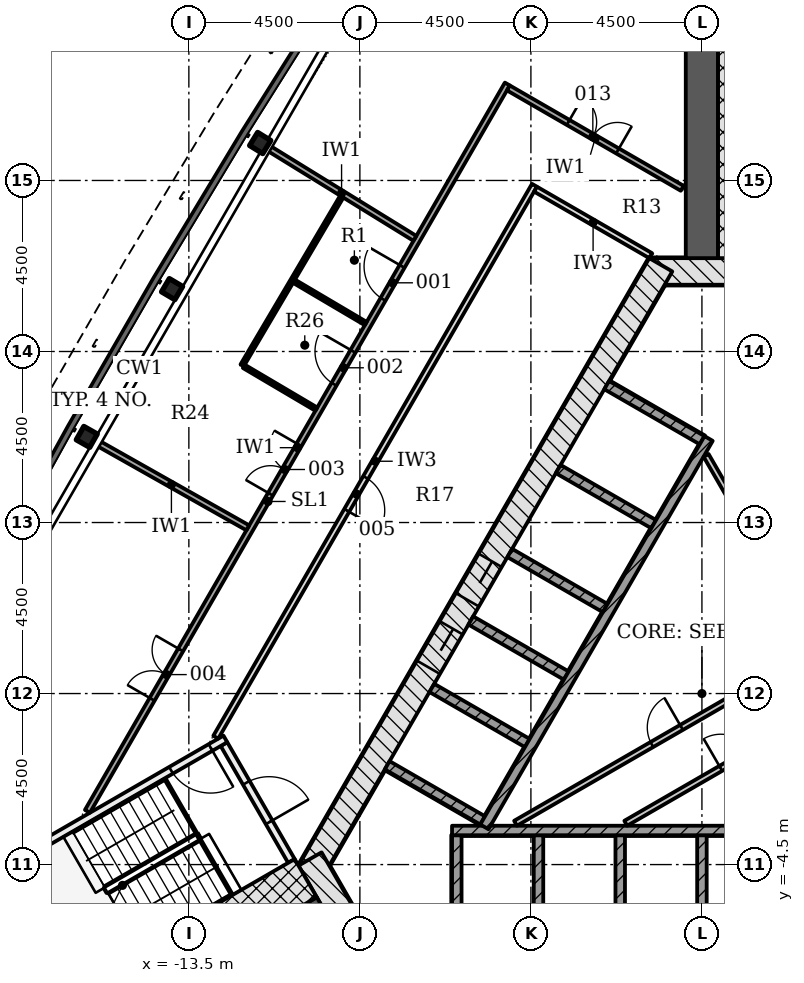
"""IFC4 building model, lengths in metres.
Left out: names, types, materials, properties, quantities, classifications, styles, units other than length and angle.
Written with IfcOpenShell. Run it as: python <this file> out.ifc"""

import sys

from ifc_helpers import new_model, si_unit, direction, frame, frame_2d, origin, origin_2d, place, context, subcontext, project, spatial, polyline, rectangle, i_section, outline, extrude, element, fill, save


model = new_model("IFC4")
c1 = context("Model", 3, precision=1e-05, world=origin(), true_north=direction((0.0, 1.0)))
c2 = subcontext(c1, "Body", "Model", "MODEL_VIEW")
j1 = project(units=[si_unit("LENGTHUNIT", "METRE"), si_unit("PLANEANGLEUNIT", "RADIAN")], contexts=[c1])
p1 = place(None, origin())
s1 = spatial("IfcSite", under=j1, at=p1, CompositionType="ELEMENT")
p2 = place(p1, origin())
s2 = spatial("IfcBuilding", under=s1, at=p2, CompositionType="ELEMENT")
p3 = place(p2, frame((0.0, 0.0, 58.2)))
s3 = spatial("IfcBuildingStorey", under=s2, at=p3, CompositionType="ELEMENT", Elevation=58.2)
p4 = place(p3, frame((1.386, 11.106, -0.2), z_axis=(0.0, 0.0, 1.0), x_axis=(-1.0, 0.0, 0.0)))
e1 = element("IfcWall", 1, at=p4, inside=s3, PredefinedType="SHEAR", context=c2, shape_type="SweptSolid", body=[
    extrude(rectangle(XDim=2.771, YDim=0.7, at=frame_2d((1.386, 0.0))), origin(), (0.0, 0.0, 1.0), 3.6),
])
p5 = place(p3, frame((-1.083, 11.281, -0.2), z_axis=(0.0, 0.0, 1.0), x_axis=(-0.500001446645, -0.866024568562, 0.0)))
e2 = element("IfcWall", 2, at=p5, inside=s3, PredefinedType="SHEAR", context=c2, shape_type="SweptSolid", body=[
    extrude(rectangle(XDim=18.458, YDim=0.7, at=frame_2d((9.229, 0.0))), origin(), (0.0, 0.0, 1.0), 3.6),
])
p6 = place(p5, frame((8.979, 0.0, 0.2)))
e3 = element("IfcOpeningElement", 3, at=p6, cuts=e2, PredefinedType="OPENING", context=c2, shape_type="SweptSolid", body=[
    extrude(rectangle(XDim=1.2, YDim=2.1, at=frame_2d((0.6, 1.05))), frame((0.0, 0.36, 0.0), z_axis=(0.0, -1.0, 0.0), x_axis=(1.0, 0.0, 0.0)), (0.0, 0.0, 1.0), 0.72),
])
p7 = place(p5, frame((11.029, 0.0, 0.2)))
e4 = element("IfcOpeningElement", 4, at=p7, cuts=e2, PredefinedType="OPENING", context=c2, shape_type="SweptSolid", body=[
    extrude(rectangle(XDim=1.2, YDim=2.1, at=frame_2d((0.6, 1.05))), frame((0.0, 0.36, 0.0), z_axis=(0.0, -1.0, 0.0), x_axis=(1.0, 0.0, 0.0)), (0.0, 0.0, 1.0), 0.72),
])
p8 = place(p3, frame((-10.311, -4.353, -0.2), z_axis=(0.0, 0.0, 1.0), x_axis=(0.500042739161, -0.866000726912, 0.0)))
e5 = element("IfcWall", 5, at=p8, inside=s3, PredefinedType="SHEAR", context=c2, shape_type="SweptSolid", body=[
    extrude(rectangle(XDim=2.771, YDim=0.7, at=frame_2d((1.386, 0.0))), origin(), (0.0, 0.0, 1.0), 3.6),
])
p9 = place(p3, frame((0.0, 11.456, -0.2), z_axis=(0.0, 0.0, 1.0), x_axis=(0.0, 1.0, 0.0)))
e6 = element("IfcWall", 6, at=p9, inside=s3, PredefinedType="SHEAR", context=c2, shape_type="SweptSolid", body=[
    extrude(rectangle(XDim=13.699, YDim=0.85, at=frame_2d((6.849, 0.0))), origin(), (0.0, 0.0, 1.0), 3.6),
])
p10 = place(p3, frame((-9.922, -5.728, -0.2), z_axis=(0.0, 0.0, 1.0), x_axis=(-0.866030067197, -0.499991922645, 0.0)))
e7 = element("IfcWall", 7, at=p10, inside=s3, PredefinedType="SHEAR", context=c2, shape_type="SweptSolid", body=[
    extrude(rectangle(XDim=13.698, YDim=0.85, at=frame_2d((6.849, 0.0))), origin(), (0.0, 0.0, 1.0), 3.6),
])
for number, where, z_axis, x_axis in (
    (8, (-11.623, 14.485, -0.2), (0.0, 0.0, 1.0), (-0.525, -0.851, 0.0)),
    (9, (-13.941, 10.641, -0.2), (0.0, 0.0, 1.0), (-0.508, -0.861, 0.0)),
    (10, (-16.186, 6.753, -0.2), (0.0, 0.0, 1.0), (-0.492, -0.871, 0.0)),
):
    element("IfcColumn", number, at=place(p3, frame(where, z_axis=z_axis, x_axis=x_axis)), inside=s3, PredefinedType="COLUMN", context=c2, shape_type="SweptSolid", body=[
        extrude(i_section(OverallWidth=0.404, OverallDepth=0.406, WebThickness=0.027, FlangeThickness=0.044, FilletRadius=0.015, at=origin_2d()), origin(), (0.0, 0.0, 1.0), 3.6),
    ])
for number, where, z_axis, x_axis in (
    (11, (-6.45, -6.228, -0.2), (0.0, 0.0, 1.0), (0.0, 1.0, 0.0)),
    (12, (-4.3, -6.228, -0.2), (0.0, 0.0, 1.0), (0.0, 1.0, 0.0)),
    (13, (-2.15, -6.228, -0.2), (0.0, 0.0, 1.0), (0.0, 1.0, 0.0)),
    (14, (0.0, -6.228, -0.2), (0.0, 0.0, 1.0), (0.0, 1.0, 0.0)),
):
    element("IfcWall", number, at=place(p3, frame(where, z_axis=z_axis, x_axis=x_axis)), inside=s3, PredefinedType="PARTITIONING", context=c2, shape_type="SweptSolid", body=[
        extrude(rectangle(XDim=2.5, YDim=0.25, at=frame_2d((1.25, 0.0))), origin(), (0.0, 0.0, 1.0), 3.6),
    ])
p11 = place(p3, frame((-6.575, -3.603, 0.0), z_axis=(0.0, 0.0, 1.0), x_axis=(1.0, 0.0, 0.0)))
e15 = element("IfcWall", 15, at=p11, inside=s3, PredefinedType="PARTITIONING", context=c2, shape_type="SweptSolid", body=[
    extrude(rectangle(XDim=13.15, YDim=0.25, at=frame_2d((6.575, 0.0))), origin(), (0.0, 0.0, 1.0), 3.4),
])
p12 = place(p3, frame((-2.506, 8.115, -0.2), z_axis=(0.0, 0.0, 1.0), x_axis=(0.865996321171, -0.50005036918, 0.0)))
e16 = element("IfcWall", 16, at=p12, inside=s3, PredefinedType="PARTITIONING", context=c2, shape_type="SweptSolid", body=[
    extrude(rectangle(XDim=2.9, YDim=0.25, at=frame_2d((1.45, 0.0))), origin(), (0.0, 0.0, 1.0), 3.6),
])
for number, where, z_axis, x_axis in (
    (17, (-3.781, 5.907, -0.2), (0.0, 0.0, 1.0), (0.866, -0.5, 0.0)),
    (18, (-5.056, 3.699, -0.2), (0.0, 0.0, 1.0), (0.866, -0.5, 0.0)),
    (19, (-6.081, 1.923, -0.2), (0.0, 0.0, 1.0), (0.866, -0.5, 0.0)),
    (20, (-7.106, 0.148, -0.2), (0.0, 0.0, 1.0), (0.866, -0.5, 0.0)),
    (21, (-8.281, -1.887, -0.2), (0.0, 0.0, 1.0), (0.866, -0.5, 0.0)),
):
    element("IfcWall", number, at=place(p3, frame(where, z_axis=z_axis, x_axis=x_axis)), inside=s3, PredefinedType="PARTITIONING", context=c2, shape_type="SweptSolid", body=[
        extrude(rectangle(XDim=2.9, YDim=0.25, at=frame_2d((1.45, 0.0))), origin(), (0.0, 0.0, 1.0), 3.6),
    ])
p13 = place(p3, frame((0.176, 6.711, 0.0), z_axis=(0.0, 0.0, 1.0), x_axis=(-0.500004227369, -0.866022963098, 0.0)))
e22 = element("IfcWall", 22, at=p13, inside=s3, PredefinedType="PARTITIONING", context=c2, shape_type="SweptSolid", body=[
    extrude(rectangle(XDim=11.8, YDim=0.25, at=frame_2d((5.9, 0.0))), origin(), (0.0, 0.0, 1.0), 3.4),
])
p14 = place(p3, frame((-4.904, -3.413, 0.0), z_axis=(0.0, 0.0, 1.0), x_axis=(0.866020716117, 0.500008119189, 0.0)))
e23 = element("IfcWall", 23, at=p14, inside=s3, PredefinedType="PARTITIONING", context=c2, shape_type="SweptSolid", body=[
    extrude(rectangle(XDim=12.182, YDim=0.15, at=frame_2d((6.091, 0.0))), origin(), (0.0, 0.0, 1.0), 3.4),
])
p15 = place(p14, frame((4.142, 0.0, 0.0)))
e24 = element("IfcOpeningElement", 24, at=p15, cuts=e23, PredefinedType="OPENING", context=c2, shape_type="SweptSolid", body=[
    extrude(rectangle(XDim=0.9, YDim=2.1, at=frame_2d((0.45, 1.05))), frame((0.0, 0.085, 0.0), z_axis=(0.0, -1.0, 0.0), x_axis=(1.0, 0.0, 0.0)), (0.0, 0.0, 1.0), 0.17),
])
p16 = place(p3, frame((-2.004, -3.413, 0.0), z_axis=(0.0, 0.0, 1.0), x_axis=(0.866030034802, 0.499991978756, 0.0)))
e25 = element("IfcWall", 25, at=p16, inside=s3, PredefinedType="PARTITIONING", context=c2, shape_type="SweptSolid", body=[
    extrude(rectangle(XDim=9.671, YDim=0.15, at=frame_2d((4.835, 0.0))), origin(), (0.0, 0.0, 1.0), 3.4),
])
p17 = place(p16, frame((2.886, 0.0, 0.0)))
e26 = element("IfcOpeningElement", 26, at=p17, cuts=e25, PredefinedType="OPENING", context=c2, shape_type="SweptSolid", body=[
    extrude(rectangle(XDim=0.9, YDim=2.1, at=frame_2d((0.45, 1.05))), frame((0.0, 0.085, 0.0), z_axis=(0.0, -1.0, 0.0), x_axis=(1.0, 0.0, 0.0)), (0.0, 0.0, 1.0), 0.17),
])
p18 = place(p3, frame((2.86, 1.503, 0.0), z_axis=(0.0, 0.0, 1.0), x_axis=(-0.500014382217, 0.866017100048, 0.0)))
e27 = element("IfcWall", 27, at=p18, inside=s3, PredefinedType="PARTITIONING", context=c2, shape_type="SweptSolid", body=[
    extrude(rectangle(XDim=5.502, YDim=0.15, at=frame_2d((2.751, 0.0))), origin(), (0.0, 0.0, 1.0), 3.4),
])
p19 = place(p3, frame((1.005, 11.456, -0.2), z_axis=(0.0, 0.0, 1.0), x_axis=(0.0, 1.0, 0.0)))
e28 = element("IfcWall", 28, at=p19, inside=s3, PredefinedType="SHEAR", context=c2, shape_type="SweptSolid", body=[
    extrude(rectangle(XDim=7.2, YDim=1.161, at=frame_2d((3.6, 0.0))), origin(), (0.0, 0.0, 1.0), 3.6),
])
p20 = place(p3, frame((-12.576, -1.331, -0.2), z_axis=(0.0, 0.0, 1.0), x_axis=(0.499970499736, -0.8660424351, 0.0)))
e29 = element("IfcWall", 29, at=p20, inside=s3, PredefinedType="SHEAR", context=c2, shape_type="SweptSolid", body=[
    extrude(rectangle(XDim=3.55, YDim=0.2, at=frame_2d((1.775, 0.0))), origin(), (0.0, 0.0, 1.0), 3.6),
])
p21 = place(p20, frame((1.175, 0.0, 0.2)))
e30 = element("IfcOpeningElement", 30, at=p21, cuts=e29, PredefinedType="OPENING", context=c2, shape_type="SweptSolid", body=[
    extrude(rectangle(XDim=1.2, YDim=2.1, at=frame_2d((0.6, 1.05))), frame((0.0, 0.11, 0.0), z_axis=(0.0, -1.0, 0.0), x_axis=(1.0, 0.0, 0.0)), (0.0, 0.0, 1.0), 0.22),
])
p22 = place(p3, frame((-12.539, -1.194, -0.2), z_axis=(0.0, 0.0, 1.0), x_axis=(-0.866045472092, -0.499965239061, 0.0)))
e31 = element("IfcWall", 31, at=p22, inside=s3, PredefinedType="SHEAR", context=c2, shape_type="SweptSolid", body=[
    extrude(rectangle(XDim=5.6, YDim=0.2, at=frame_2d((2.8, 0.0))), origin(), (0.0, 0.0, 1.0), 3.6),
])
p23 = place(p22, frame((0.45, 0.0, 0.2)))
e32 = element("IfcOpeningElement", 32, at=p23, cuts=e31, PredefinedType="OPENING", context=c2, shape_type="SweptSolid", body=[
    extrude(rectangle(XDim=1.2, YDim=2.1, at=frame_2d((0.6, 1.05))), frame((0.0, 0.11, 0.0), z_axis=(0.0, -1.0, 0.0), x_axis=(1.0, 0.0, 0.0)), (0.0, 0.0, 1.0), 0.22),
])
p24 = place(p3, frame((-10.424, -4.858, -0.2), z_axis=(0.0, 0.0, 1.0), x_axis=(-0.866033125095, -0.499986626058, 0.0)))
e33 = element("IfcWall", 33, at=p24, inside=s3, PredefinedType="SHEAR", context=c2, shape_type="SweptSolid", body=[
    extrude(rectangle(XDim=7.2, YDim=1.161, at=frame_2d((3.6, 0.0))), origin(), (0.0, 0.0, 1.0), 3.6),
])
p25 = place(p3, frame((0.0, 0.0, -0.2)))
e34 = element("IfcWall", 34, at=p25, inside=s3, PredefinedType="SHEAR", context=c2, shape_type="SweptSolid", body=[
    extrude(outline(polyline([(-17.439, -3.907), (-18.025, -6.093), (-16.95, -7.955), (-16.777, -7.855), (-17.81, -6.065), (-17.267, -4.039), (-17.339, -4.081), (-17.339, -4.081), (-17.339, -4.081), (-17.339, -4.081), (-17.339, -4.081), (-17.339, -4.081), (-17.339, -4.081), (-17.339, -4.081), (-17.339, -4.081), (-17.339, -4.081), (-17.339, -4.081), (-17.339, -4.081), (-17.339, -4.081), (-17.339, -4.081), (-17.339, -4.081), (-17.339, -4.081), (-17.339, -4.081), (-17.439, -3.907)])), origin(), (0.0, 0.0, 1.0), 3.6),
])
p26 = place(p3, frame((-16.169, -3.099, 0.0), z_axis=(0.0, 0.0, 1.0), x_axis=(0.499999805269, 0.866025516212, 0.0)))
e35 = element("IfcWall", 35, at=p26, inside=s3, PredefinedType="PARTITIONING", context=c2, shape_type="SweptSolid", body=[
    extrude(rectangle(XDim=22.097, YDim=0.15, at=frame_2d((11.049, 0.0))), origin(), (0.0, 0.0, 1.0), 2.778),
])
p27 = place(p26, frame((15.558, 0.0, 0.0)))
e36 = element("IfcOpeningElement", 36, at=p27, cuts=e35, PredefinedType="OPENING", context=c2, shape_type="SweptSolid", body=[
    extrude(rectangle(XDim=1.0, YDim=2.1, at=frame_2d((0.5, 1.05))), frame((0.0, 0.085, 0.0), z_axis=(0.0, -1.0, 0.0), x_axis=(1.0, 0.0, 0.0)), (0.0, 0.0, 1.0), 0.17),
])
p28 = place(p26, frame((12.976, 0.0, 0.0)))
e37 = element("IfcOpeningElement", 37, at=p28, cuts=e35, PredefinedType="OPENING", context=c2, shape_type="SweptSolid", body=[
    extrude(rectangle(XDim=1.0, YDim=2.1, at=frame_2d((0.5, 1.05))), frame((0.0, 0.085, 0.0), z_axis=(0.0, -1.0, 0.0), x_axis=(1.0, 0.0, 0.0)), (0.0, 0.0, 1.0), 0.17),
])
p29 = place(p26, frame((9.635, 0.0, 0.0)))
e38 = element("IfcOpeningElement", 38, at=p29, cuts=e35, PredefinedType="OPENING", context=c2, shape_type="SweptSolid", body=[
    extrude(rectangle(XDim=1.5, YDim=2.1, at=frame_2d((0.75, 1.05))), frame((0.0, 0.085, 0.0), z_axis=(0.0, -1.0, 0.0), x_axis=(1.0, 0.0, 0.0)), (0.0, 0.0, 1.0), 0.17),
])
p30 = place(p26, frame((3.404, 0.0, 0.0)))
e39 = element("IfcOpeningElement", 39, at=p30, cuts=e35, PredefinedType="OPENING", context=c2, shape_type="SweptSolid", body=[
    extrude(rectangle(XDim=1.5, YDim=2.1, at=frame_2d((0.75, 1.05))), frame((0.0, 0.085, 0.0), z_axis=(0.0, -1.0, 0.0), x_axis=(1.0, 0.0, 0.0)), (0.0, 0.0, 1.0), 0.17),
])
p31 = place(p3, frame((-4.407, 13.374, 0.0), z_axis=(0.0, 0.0, 1.0), x_axis=(-0.499997181693, -0.866027030928, 0.0)))
e40 = element("IfcWall", 40, at=p31, inside=s3, PredefinedType="PARTITIONING", context=c2, shape_type="SweptSolid", body=[
    extrude(rectangle(XDim=16.77, YDim=0.15, at=frame_2d((8.385, 0.0))), origin(), (0.0, 0.0, 1.0), 2.778),
])
p32 = place(p31, frame((8.879, 0.0, 0.0)))
e41 = element("IfcOpeningElement", 41, at=p32, cuts=e40, PredefinedType="OPENING", context=c2, shape_type="SweptSolid", body=[
    extrude(rectangle(XDim=1.0, YDim=2.1, at=frame_2d((0.5, 1.05))), frame((0.0, 0.085, 0.0), z_axis=(0.0, -1.0, 0.0), x_axis=(1.0, 0.0, 0.0)), (0.0, 0.0, 1.0), 0.17),
])
p33 = place(p3, frame((-5.093, 15.935, 0.0), z_axis=(0.0, 0.0, 1.0), x_axis=(0.866033195618, -0.499986503906, 0.0)))
e42 = element("IfcWall", 42, at=p33, inside=s3, PredefinedType="PARTITIONING", context=c2, shape_type="SweptSolid", body=[
    extrude(rectangle(XDim=5.282, YDim=0.15, at=frame_2d((2.641, 0.0))), origin(), (0.0, 0.0, 1.0), 3.4),
])
p34 = place(p33, frame((1.816, 0.0, 0.0)))
e43 = element("IfcOpeningElement", 43, at=p34, cuts=e42, PredefinedType="OPENING", context=c2, shape_type="SweptSolid", body=[
    extrude(rectangle(XDim=1.5, YDim=2.1, at=frame_2d((0.75, 1.05))), frame((0.0, 0.085, 0.0), z_axis=(0.0, -1.0, 0.0), x_axis=(1.0, 0.0, 0.0)), (0.0, 0.0, 1.0), 0.17),
])
p35 = place(p3, frame((-4.379, 13.271, 0.0), z_axis=(0.0, 0.0, 1.0), x_axis=(0.866019471182, -0.500010275428, 0.0)))
e44 = element("IfcWall", 44, at=p35, inside=s3, PredefinedType="PARTITIONING", context=c2, shape_type="SweptSolid", body=[
    extrude(rectangle(XDim=3.5, YDim=0.15, at=frame_2d((1.75, 0.0))), origin(), (0.0, 0.0, 1.0), 3.4),
])
p36 = place(p3, frame((-15.969, 6.63, 0.0), z_axis=(0.0, 0.0, 1.0), x_axis=(0.870757830179, -0.491712112097, 0.0)))
e45 = element("IfcWall", 45, at=p36, inside=s3, PredefinedType="PARTITIONING", context=c2, shape_type="SweptSolid", body=[
    extrude(rectangle(XDim=4.615, YDim=0.15, at=frame_2d((2.308, 0.0))), origin(), (0.0, 0.0, 1.0), 2.778),
])
p37 = place(p3, frame((-11.41, 14.354, 0.0), z_axis=(0.0, 0.0, 1.0), x_axis=(0.851336169767, -0.52462055435, 0.0)))
e46 = element("IfcWall", 46, at=p37, inside=s3, PredefinedType="PARTITIONING", context=c2, shape_type="SweptSolid", body=[
    extrude(rectangle(XDim=4.53, YDim=0.15, at=frame_2d((2.265, 0.0))), origin(), (0.0, 0.0, 1.0), 2.778),
])
p38 = place(p3, frame((-9.478, 13.074, 0.0), z_axis=(0.0, 0.0, 1.0), x_axis=(-0.508234581351, -0.86121867741, 0.0)))
e47 = element("IfcWall", 47, at=p38, inside=s3, PredefinedType="PARTITIONING", context=c2, shape_type="SweptSolid", body=[
    extrude(rectangle(XDim=5.155, YDim=0.1, at=frame_2d((2.577, 0.0))), origin(), (0.0, 0.0, 1.0), 2.778),
])
p39 = place(p3, frame((-12.055, 8.61, 0.0), z_axis=(0.0, 0.0, 1.0), x_axis=(0.861222482917, -0.508228132749, 0.0)))
e48 = element("IfcWall", 48, at=p39, inside=s3, PredefinedType="PARTITIONING", context=c2, shape_type="SweptSolid", body=[
    extrude(rectangle(XDim=2.216, YDim=0.1, at=frame_2d((1.108, 0.0))), origin(), (0.0, 0.0, 1.0), 3.4),
])
p40 = place(p3, frame((-10.733, 10.849, 0.0), z_axis=(0.0, 0.0, 1.0), x_axis=(0.861225852057, -0.5082224235, 0.0)))
e49 = element("IfcWall", 49, at=p40, inside=s3, PredefinedType="PARTITIONING", context=c2, shape_type="SweptSolid", body=[
    extrude(rectangle(XDim=2.191, YDim=0.1, at=frame_2d((1.095, 0.0))), origin(), (0.0, 0.0, 1.0), 3.4),
])
p41 = place(p6, origin())
e50 = element("IfcDoor", 50, at=p41, inside=s3, OperationType="DOUBLE_DOOR_SLIDING", PredefinedType="DOOR", context=c2, shape_type="SweptSolid", body=[
    extrude(rectangle(XDim=1.2, YDim=2.1, at=frame_2d((0.6, 1.05))), frame((0.0, 0.025, 0.0), z_axis=(0.0, -1.0, 0.0), x_axis=(1.0, 0.0, 0.0)), (0.0, 0.0, 1.0), 0.05),
])
fill(e3, e50)
p42 = place(p7, origin())
e51 = element("IfcDoor", 51, at=p42, inside=s3, OperationType="DOUBLE_DOOR_SLIDING", PredefinedType="DOOR", context=c2, shape_type="SweptSolid", body=[
    extrude(rectangle(XDim=1.2, YDim=2.1, at=frame_2d((0.6, 1.05))), frame((0.0, 0.025, 0.0), z_axis=(0.0, -1.0, 0.0), x_axis=(1.0, 0.0, 0.0)), (0.0, 0.0, 1.0), 0.05),
])
fill(e4, e51)
p43 = place(p17, origin())
e52 = element("IfcDoor", 52, at=p43, inside=s3, OperationType="SINGLE_SWING_LEFT", PredefinedType="DOOR", context=c2, shape_type="SweptSolid", body=[
    extrude(rectangle(XDim=0.9, YDim=2.1, at=frame_2d((0.45, 1.05))), frame((0.0, 0.025, 0.0), z_axis=(0.0, -1.0, 0.0), x_axis=(1.0, 0.0, 0.0)), (0.0, 0.0, 1.0), 0.05),
])
fill(e26, e52)
p44 = place(p15, origin())
e53 = element("IfcDoor", 53, at=p44, inside=s3, OperationType="SINGLE_SWING_RIGHT", PredefinedType="DOOR", context=c2, shape_type="SweptSolid", body=[
    extrude(rectangle(XDim=0.9, YDim=2.1, at=frame_2d((0.45, 1.05))), frame((0.0, 0.025, 0.0), z_axis=(0.0, -1.0, 0.0), x_axis=(1.0, 0.0, 0.0)), (0.0, 0.0, 1.0), 0.05),
])
fill(e24, e53)
p45 = place(p21, origin())
e54 = element("IfcDoor", 54, at=p45, inside=s3, OperationType="SINGLE_SWING_RIGHT", PredefinedType="DOOR", context=c2, shape_type="SweptSolid", body=[
    extrude(rectangle(XDim=1.2, YDim=2.1, at=frame_2d((0.6, 1.05))), frame((0.0, 0.025, 0.0), z_axis=(0.0, -1.0, 0.0), x_axis=(1.0, 0.0, 0.0)), (0.0, 0.0, 1.0), 0.05),
])
fill(e30, e54)
p46 = place(p23, origin())
e55 = element("IfcDoor", 55, at=p46, inside=s3, OperationType="SINGLE_SWING_LEFT", PredefinedType="DOOR", context=c2, shape_type="SweptSolid", body=[
    extrude(rectangle(XDim=1.2, YDim=2.1, at=frame_2d((0.6, 1.05))), frame((0.0, 0.025, 0.0), z_axis=(0.0, -1.0, 0.0), x_axis=(1.0, 0.0, 0.0)), (0.0, 0.0, 1.0), 0.05),
])
fill(e32, e55)
p47 = place(p27, origin())
e56 = element("IfcDoor", 56, at=p47, inside=s3, OperationType="SINGLE_SWING_RIGHT", PredefinedType="DOOR", context=c2, shape_type="SweptSolid", body=[
    extrude(rectangle(XDim=1.0, YDim=2.1, at=frame_2d((0.5, 1.05))), frame((0.0, 0.025, 0.0), z_axis=(0.0, -1.0, 0.0), x_axis=(1.0, 0.0, 0.0)), (0.0, 0.0, 1.0), 0.05),
])
fill(e36, e56)
p48 = place(p28, origin())
e57 = element("IfcDoor", 57, at=p48, inside=s3, OperationType="SINGLE_SWING_RIGHT", PredefinedType="DOOR", context=c2, shape_type="SweptSolid", body=[
    extrude(rectangle(XDim=1.0, YDim=2.1, at=frame_2d((0.5, 1.05))), frame((0.0, 0.025, 0.0), z_axis=(0.0, -1.0, 0.0), x_axis=(1.0, 0.0, 0.0)), (0.0, 0.0, 1.0), 0.05),
])
fill(e37, e57)
p49 = place(p29, origin())
e58 = element("IfcDoor", 58, at=p49, inside=s3, OperationType="DOUBLE_DOOR_SINGLE_SWING", PredefinedType="DOOR", context=c2, shape_type="SweptSolid", body=[
    extrude(rectangle(XDim=1.5, YDim=2.1, at=frame_2d((0.75, 1.05))), frame((0.0, 0.025, 0.0), z_axis=(0.0, -1.0, 0.0), x_axis=(1.0, 0.0, 0.0)), (0.0, 0.0, 1.0), 0.05),
])
fill(e38, e58)
p50 = place(p30, origin())
e59 = element("IfcDoor", 59, at=p50, inside=s3, OperationType="DOUBLE_DOOR_SINGLE_SWING", PredefinedType="DOOR", context=c2, shape_type="SweptSolid", body=[
    extrude(rectangle(XDim=1.5, YDim=2.1, at=frame_2d((0.75, 1.05))), frame((0.0, 0.025, 0.0), z_axis=(0.0, -1.0, 0.0), x_axis=(1.0, 0.0, 0.0)), (0.0, 0.0, 1.0), 0.05),
])
fill(e39, e59)
p51 = place(p32, origin())
e60 = element("IfcDoor", 60, at=p51, inside=s3, OperationType="SINGLE_SWING_RIGHT", PredefinedType="DOOR", context=c2, shape_type="SweptSolid", body=[
    extrude(rectangle(XDim=1.0, YDim=2.1, at=frame_2d((0.5, 1.05))), frame((0.0, 0.025, 0.0), z_axis=(0.0, -1.0, 0.0), x_axis=(1.0, 0.0, 0.0)), (0.0, 0.0, 1.0), 0.05),
])
fill(e41, e60)
p52 = place(p34, origin())
e61 = element("IfcDoor", 61, at=p52, inside=s3, OperationType="DOUBLE_DOOR_SINGLE_SWING", PredefinedType="DOOR", context=c2, shape_type="SweptSolid", body=[
    extrude(rectangle(XDim=1.5, YDim=2.1, at=frame_2d((0.75, 1.05))), frame((0.0, 0.025, 0.0), z_axis=(0.0, -1.0, 0.0), x_axis=(1.0, 0.0, 0.0)), (0.0, 0.0, 1.0), 0.05),
])
fill(e43, e61)
save(model, sys.argv[1])
